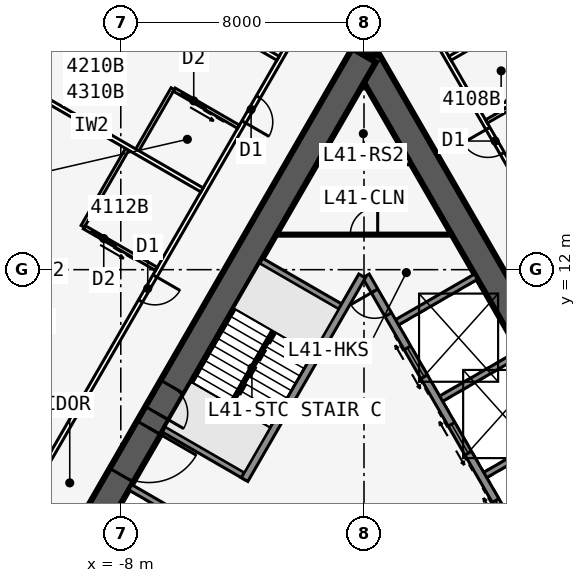
"""IFC4 building model, lengths in metres.
Left out: names, types, materials, properties, quantities, classifications, styles, units other than length and angle.
Written with IfcOpenShell. Run it as: python <this file> out.ifc"""

import sys

from ifc_helpers import new_model, si_unit, direction, frame, frame_2d, origin, place, context, subcontext, project, spatial, rectangle, extrude, element, fill, save


model = new_model("IFC4")
c1 = context("Model", 3, precision=1e-05, world=origin(), true_north=direction((0.0, 1.0)))
c2 = subcontext(c1, "Body", "Model", "MODEL_VIEW")
j1 = project(units=[si_unit("LENGTHUNIT", "METRE"), si_unit("PLANEANGLEUNIT", "RADIAN")], contexts=[c1])
p1 = place(None, origin())
s1 = spatial("IfcSite", under=j1, at=p1, CompositionType="ELEMENT")
p2 = place(p1, origin())
s2 = spatial("IfcBuilding", under=s1, at=p2, CompositionType="ELEMENT")
p3 = place(p2, frame((0.0, 0.0, 155.5)))
s3 = spatial("IfcBuildingStorey", under=s2, at=p3, CompositionType="ELEMENT", Elevation=155.5)
p4 = place(p3, frame((16.5, -9.526, 0.0), z_axis=(0.0, 0.0, 1.0), x_axis=(-0.499999749417, 0.866025548458, 0.0)))
e1 = element("IfcWall", 1, at=p4, inside=s3, PredefinedType="SHEAR", context=c2, shape_type="SweptSolid", body=[
    extrude(rectangle(XDim=33.0, YDim=0.9, at=frame_2d((16.5, 0.0))), origin(), (0.0, 0.0, 1.0), 3.4),
])
p5 = place(p4, frame((14.15, 0.0, 0.0)))
e2 = element("IfcOpeningElement", 2, at=p5, cuts=e1, PredefinedType="OPENING", context=c2, shape_type="SweptSolid", body=[
    extrude(rectangle(XDim=1.8, YDim=2.13, at=frame_2d((0.9, 1.065))), frame((0.0, 0.46, 0.0), z_axis=(0.0, -1.0, 0.0), x_axis=(1.0, 0.0, 0.0)), (0.0, 0.0, 1.0), 0.92),
])
p6 = place(p4, frame((12.6, 0.0, 0.0)))
e3 = element("IfcOpeningElement", 3, at=p6, cuts=e1, PredefinedType="OPENING", context=c2, shape_type="SweptSolid", body=[
    extrude(rectangle(XDim=1.0, YDim=2.13, at=frame_2d((0.5, 1.065))), frame((0.0, 0.46, 0.0), z_axis=(0.0, -1.0, 0.0), x_axis=(1.0, 0.0, 0.0)), (0.0, 0.0, 1.0), 0.92),
])
p7 = place(p3, frame((5.379, 2.586, 0.0), z_axis=(0.0, 0.0, 1.0), x_axis=(-0.500001375892, 0.866024609411, 0.0)))
e4 = element("IfcWall", 4, at=p7, inside=s3, PredefinedType="SOLIDWALL", context=c2, shape_type="SweptSolid", body=[
    extrude(rectangle(XDim=10.633, YDim=0.25, at=frame_2d((5.316, 0.0))), origin(), (0.0, 0.0, 1.0), 3.235),
])
p8 = place(p7, frame((9.164, 0.0, 0.0)))
e5 = element("IfcOpeningElement", 5, at=p8, cuts=e4, PredefinedType="OPENING", context=c2, shape_type="SweptSolid", body=[
    extrude(rectangle(XDim=0.9, YDim=2.13, at=frame_2d((0.45, 1.065))), frame((0.0, 0.135, 0.0), z_axis=(0.0, -1.0, 0.0), x_axis=(1.0, 0.0, 0.0)), (0.0, 0.0, 1.0), 0.27),
])
p9 = place(p7, frame((1.0, 0.0, 0.0)))
e6 = element("IfcOpeningElement", 6, at=p9, cuts=e4, PredefinedType="OPENING", context=c2, shape_type="SweptSolid", body=[
    extrude(rectangle(XDim=1.1, YDim=2.13, at=frame_2d((0.55, 1.065))), frame((0.0, 0.135, 0.0), z_axis=(0.0, -1.0, 0.0), x_axis=(1.0, 0.0, 0.0)), (0.0, 0.0, 1.0), 0.27),
])
p10 = place(p7, frame((3.9, 0.0, 0.0)))
e7 = element("IfcOpeningElement", 7, at=p10, cuts=e4, PredefinedType="OPENING", context=c2, shape_type="SweptSolid", body=[
    extrude(rectangle(XDim=1.1, YDim=2.13, at=frame_2d((0.55, 1.065))), frame((0.0, 0.135, 0.0), z_axis=(0.0, -1.0, 0.0), x_axis=(1.0, 0.0, 0.0)), (0.0, 0.0, 1.0), 0.27),
])
p11 = place(p7, frame((6.8, 0.0, 0.0)))
e8 = element("IfcOpeningElement", 8, at=p11, cuts=e4, PredefinedType="OPENING", context=c2, shape_type="SweptSolid", body=[
    extrude(rectangle(XDim=1.1, YDim=2.13, at=frame_2d((0.55, 1.065))), frame((0.0, 0.135, 0.0), z_axis=(0.0, -1.0, 0.0), x_axis=(1.0, 0.0, 0.0)), (0.0, 0.0, 1.0), 0.27),
])
for number, where, z_axis, x_axis in (
    (9, (3.879, 5.184, 0.0), (0.0, 0.0, 1.0), (0.866, 0.5, 0.0)),
    (10, (2.429, 7.696, 0.0), (0.0, 0.0, 1.0), (0.866, 0.5, 0.0)),
    (11, (0.979, 10.207, 0.0), (0.0, 0.0, 1.0), (0.866, 0.5, 0.0)),
):
    element("IfcWall", number, at=place(p3, frame(where, z_axis=z_axis, x_axis=x_axis)), inside=s3, PredefinedType="SOLIDWALL", context=c2, shape_type="SweptSolid", body=[
        extrude(rectangle(XDim=3.125, YDim=0.2, at=frame_2d((1.562, 0.0))), origin(), (0.0, 0.0, 1.0), 3.235),
    ])
p12 = place(p3, frame((0.0, 19.052, 0.0), z_axis=(0.0, 0.0, 1.0), x_axis=(-0.499999749417, -0.866025548458, 0.0)))
e12 = element("IfcWall", 12, at=p12, inside=s3, PredefinedType="SHEAR", context=c2, shape_type="SweptSolid", body=[
    extrude(rectangle(XDim=33.0, YDim=0.9, at=frame_2d((16.5, 0.0))), origin(), (0.0, 0.0, 1.0), 3.4),
])
p13 = place(p12, frame((14.15, 0.0, 0.0)))
e13 = element("IfcOpeningElement", 13, at=p13, cuts=e12, PredefinedType="OPENING", context=c2, shape_type="SweptSolid", body=[
    extrude(rectangle(XDim=1.8, YDim=2.13, at=frame_2d((0.9, 1.065))), frame((0.0, 0.46, 0.0), z_axis=(0.0, -1.0, 0.0), x_axis=(1.0, 0.0, 0.0)), (0.0, 0.0, 1.0), 0.92),
])
p14 = place(p12, frame((12.6, 0.0, 0.0)))
e14 = element("IfcOpeningElement", 14, at=p14, cuts=e12, PredefinedType="OPENING", context=c2, shape_type="SweptSolid", body=[
    extrude(rectangle(XDim=1.0, YDim=2.13, at=frame_2d((0.5, 1.065))), frame((0.0, 0.46, 0.0), z_axis=(0.0, -1.0, 0.0), x_axis=(1.0, 0.0, 0.0)), (0.0, 0.0, 1.0), 0.92),
])
p15 = place(p3, frame((-0.062, 11.794, 0.0), z_axis=(0.0, 0.0, 1.0), x_axis=(-0.500006680225, -0.86602154692, 0.0)))
e15 = element("IfcWall", 15, at=p15, inside=s3, PredefinedType="SOLIDWALL", context=c2, shape_type="SweptSolid", body=[
    extrude(rectangle(XDim=7.733, YDim=0.25, at=frame_2d((3.866, 0.0))), origin(), (0.0, 0.0, 1.0), 3.235),
])
for number, where, z_axis, x_axis in (
    (16, (-0.679, 10.727, 0.0), (0.0, 0.0, 1.0), (-0.866, 0.5, 0.0)),
    (17, (-3.879, 5.184, 0.0), (0.0, 0.0, 1.0), (-0.866, 0.5, 0.0)),
    (18, (-4.979, 3.279, 0.0), (0.0, 0.0, 1.0), (-0.866, 0.5, 0.0)),
):
    element("IfcWall", number, at=place(p3, frame(where, z_axis=z_axis, x_axis=x_axis)), inside=s3, PredefinedType="SOLIDWALL", context=c2, shape_type="SweptSolid", body=[
        extrude(rectangle(XDim=3.125, YDim=0.2, at=frame_2d((1.562, 0.0))), origin(), (0.0, 0.0, 1.0), 3.235),
    ])
p16 = place(p3, frame((0.0, 19.052, 0.0), z_axis=(0.0, 0.0, 1.0), x_axis=(0.0, 1.0, 0.0)))
e19 = element("IfcWall", 19, at=p16, inside=s3, PredefinedType="SHEAR", context=c2, shape_type="SweptSolid", body=[
    extrude(rectangle(XDim=4.746, YDim=0.9, at=frame_2d((2.373, 0.0))), origin(), (0.0, 0.0, 1.0), 3.4),
])
p17 = place(p16, frame((1.8, 0.0, 0.0)))
e20 = element("IfcOpeningElement", 20, at=p17, cuts=e19, PredefinedType="OPENING", context=c2, shape_type="SweptSolid", body=[
    extrude(rectangle(XDim=1.8, YDim=2.13, at=frame_2d((0.9, 1.065))), frame((0.0, 0.46, 0.0), z_axis=(0.0, -1.0, 0.0), x_axis=(1.0, 0.0, 0.0)), (0.0, 0.0, 1.0), 0.92),
])
p18 = place(p3, frame((-9.465, 22.76, 0.0), z_axis=(0.0, 0.0, 1.0), x_axis=(-0.641810386606, -0.766863369607, 0.0)))
e21 = element("IfcWall", 21, at=p18, inside=s3, PredefinedType="STANDARD", context=c2, shape_type="SweptSolid", body=[
    extrude(rectangle(XDim=5.076, YDim=0.25, at=frame_2d((2.538, 0.0))), origin(), (0.0, 0.0, 1.0), 3.235),
])
p19 = place(p18, frame((0.738, 0.0, 0.45)))
e22 = element("IfcOpeningElement", 22, at=p19, cuts=e21, PredefinedType="OPENING", context=c2, shape_type="SweptSolid", body=[
    extrude(rectangle(XDim=3.6, YDim=2.4, at=frame_2d((1.8, 1.2))), frame((0.0, 0.135, 0.0), z_axis=(0.0, -1.0, 0.0), x_axis=(1.0, 0.0, 0.0)), (0.0, 0.0, 1.0), 0.27),
])
p20 = place(p3, frame((20.027, -10.985, 0.0), z_axis=(0.0, 0.0, 1.0), x_axis=(-0.500001677587, 0.866024435227, 0.0)))
e23 = element("IfcWall", 23, at=p20, inside=s3, PredefinedType="PARTITIONING", context=c2, shape_type="SweptSolid", body=[
    extrude(rectangle(XDim=39.054, YDim=0.15, at=frame_2d((19.527, 0.0))), origin(), (0.0, 0.0, 1.0), 3.235),
])
p21 = place(p20, frame((1.558, 0.0, 0.0)))
e24 = element("IfcOpeningElement", 24, at=p21, cuts=e23, PredefinedType="OPENING", context=c2, shape_type="SweptSolid", body=[
    extrude(rectangle(XDim=0.95, YDim=2.13, at=frame_2d((0.475, 1.065))), frame((0.0, 0.085, 0.0), z_axis=(0.0, -1.0, 0.0), x_axis=(1.0, 0.0, 0.0)), (0.0, 0.0, 1.0), 0.17),
])
p22 = place(p20, frame((15.352, 0.0, 0.0)))
e25 = element("IfcOpeningElement", 25, at=p22, cuts=e23, PredefinedType="OPENING", context=c2, shape_type="SweptSolid", body=[
    extrude(rectangle(XDim=0.95, YDim=2.13, at=frame_2d((0.475, 1.065))), frame((0.0, 0.085, 0.0), z_axis=(0.0, -1.0, 0.0), x_axis=(1.0, 0.0, 0.0)), (0.0, 0.0, 1.0), 0.17),
])
p23 = place(p20, frame((22.752, 0.0, 0.0)))
e26 = element("IfcOpeningElement", 26, at=p23, cuts=e23, PredefinedType="OPENING", context=c2, shape_type="SweptSolid", body=[
    extrude(rectangle(XDim=0.95, YDim=2.13, at=frame_2d((0.475, 1.065))), frame((0.0, 0.085, 0.0), z_axis=(0.0, -1.0, 0.0), x_axis=(1.0, 0.0, 0.0)), (0.0, 0.0, 1.0), 0.17),
])
p24 = place(p20, frame((30.952, 0.0, 0.0)))
e27 = element("IfcOpeningElement", 27, at=p24, cuts=e23, PredefinedType="OPENING", context=c2, shape_type="SweptSolid", body=[
    extrude(rectangle(XDim=0.95, YDim=2.13, at=frame_2d((0.475, 1.065))), frame((0.0, 0.085, 0.0), z_axis=(0.0, -1.0, 0.0), x_axis=(1.0, 0.0, 0.0)), (0.0, 0.0, 1.0), 0.17),
])
p25 = place(p20, frame((37.752, 0.0, 0.0)))
e28 = element("IfcOpeningElement", 28, at=p25, cuts=e23, PredefinedType="OPENING", context=c2, shape_type="SweptSolid", body=[
    extrude(rectangle(XDim=0.95, YDim=2.13, at=frame_2d((0.475, 1.065))), frame((0.0, 0.085, 0.0), z_axis=(0.0, -1.0, 0.0), x_axis=(1.0, 0.0, 0.0)), (0.0, 0.0, 1.0), 0.17),
])
p26 = place(p3, frame((2.829, 18.954, 0.0), z_axis=(0.0, 0.0, 1.0), x_axis=(0.866015739374, 0.500016738876, 0.0)))
e29 = element("IfcWall", 29, at=p26, inside=s3, PredefinedType="PARTITIONING", context=c2, shape_type="SweptSolid", body=[
    extrude(rectangle(XDim=7.516, YDim=0.15, at=frame_2d((3.758, 0.0))), origin(), (0.0, 0.0, 1.0), 2.389),
])
p27 = place(p3, frame((4.029, 16.875, 0.0), z_axis=(0.0, 0.0, 1.0), x_axis=(0.865980627057, 0.500077547548, 0.0)))
e30 = element("IfcWall", 30, at=p27, inside=s3, PredefinedType="PLUMBINGWALL", context=c2, shape_type="SweptSolid", body=[
    extrude(rectangle(XDim=2.44, YDim=0.12, at=frame_2d((1.22, 0.0))), origin(), (0.0, 0.0, 1.0), 3.235),
])
p28 = place(p27, frame((1.25, 0.0, 0.0)))
e31 = element("IfcOpeningElement", 31, at=p28, cuts=e30, PredefinedType="OPENING", context=c2, shape_type="SweptSolid", body=[
    extrude(rectangle(XDim=0.9, YDim=2.13, at=frame_2d((0.45, 1.065))), frame((0.0, 0.07, 0.0), z_axis=(0.0, -1.0, 0.0), x_axis=(1.0, 0.0, 0.0)), (0.0, 0.0, 1.0), 0.14),
])
p29 = place(p3, frame((-0.5, 22.836, 0.0), z_axis=(0.0, 0.0, 1.0), x_axis=(-0.500001677587, -0.866024435227, 0.0)))
e32 = element("IfcWall", 32, at=p29, inside=s3, PredefinedType="PARTITIONING", context=c2, shape_type="SweptSolid", body=[
    extrude(rectangle(XDim=39.054, YDim=0.15, at=frame_2d((19.527, 0.0))), origin(), (0.0, 0.0, 1.0), 3.235),
])
p30 = place(p29, frame((0.352, 0.0, 0.0)))
e33 = element("IfcOpeningElement", 33, at=p30, cuts=e32, PredefinedType="OPENING", context=c2, shape_type="SweptSolid", body=[
    extrude(rectangle(XDim=0.95, YDim=2.13, at=frame_2d((0.475, 1.065))), frame((0.0, 0.085, 0.0), z_axis=(0.0, -1.0, 0.0), x_axis=(1.0, 0.0, 0.0)), (0.0, 0.0, 1.0), 0.17),
])
p31 = place(p29, frame((5.952, 0.0, 0.0)))
e34 = element("IfcOpeningElement", 34, at=p31, cuts=e32, PredefinedType="OPENING", context=c2, shape_type="SweptSolid", body=[
    extrude(rectangle(XDim=0.95, YDim=2.13, at=frame_2d((0.475, 1.065))), frame((0.0, 0.085, 0.0), z_axis=(0.0, -1.0, 0.0), x_axis=(1.0, 0.0, 0.0)), (0.0, 0.0, 1.0), 0.17),
])
p32 = place(p29, frame((12.752, 0.0, 0.0)))
e35 = element("IfcOpeningElement", 35, at=p32, cuts=e32, PredefinedType="OPENING", context=c2, shape_type="SweptSolid", body=[
    extrude(rectangle(XDim=0.95, YDim=2.13, at=frame_2d((0.475, 1.065))), frame((0.0, 0.085, 0.0), z_axis=(0.0, -1.0, 0.0), x_axis=(1.0, 0.0, 0.0)), (0.0, 0.0, 1.0), 0.17),
])
p33 = place(p29, frame((25.352, 0.0, 0.0)))
e36 = element("IfcOpeningElement", 36, at=p33, cuts=e32, PredefinedType="OPENING", context=c2, shape_type="SweptSolid", body=[
    extrude(rectangle(XDim=0.95, YDim=2.13, at=frame_2d((0.475, 1.065))), frame((0.0, 0.085, 0.0), z_axis=(0.0, -1.0, 0.0), x_axis=(1.0, 0.0, 0.0)), (0.0, 0.0, 1.0), 0.17),
])
p34 = place(p29, frame((32.152, 0.0, 0.0)))
e37 = element("IfcOpeningElement", 37, at=p34, cuts=e32, PredefinedType="OPENING", context=c2, shape_type="SweptSolid", body=[
    extrude(rectangle(XDim=0.95, YDim=2.13, at=frame_2d((0.475, 1.065))), frame((0.0, 0.085, 0.0), z_axis=(0.0, -1.0, 0.0), x_axis=(1.0, 0.0, 0.0)), (0.0, 0.0, 1.0), 0.17),
])
p35 = place(p29, frame((37.752, 0.0, 0.0)))
e38 = element("IfcOpeningElement", 38, at=p35, cuts=e32, PredefinedType="OPENING", context=c2, shape_type="SweptSolid", body=[
    extrude(rectangle(XDim=0.95, YDim=2.13, at=frame_2d((0.475, 1.065))), frame((0.0, 0.085, 0.0), z_axis=(0.0, -1.0, 0.0), x_axis=(1.0, 0.0, 0.0)), (0.0, 0.0, 1.0), 0.17),
])
p36 = place(p3, frame((-2.829, 18.954, 0.0), z_axis=(0.0, 0.0, 1.0), x_axis=(-0.866015739374, 0.500016738876, 0.0)))
e39 = element("IfcWall", 39, at=p36, inside=s3, PredefinedType="PARTITIONING", context=c2, shape_type="SweptSolid", body=[
    extrude(rectangle(XDim=7.516, YDim=0.15, at=frame_2d((3.758, 0.0))), origin(), (0.0, 0.0, 1.0), 2.389),
])
p37 = place(p3, frame((-5.329, 14.623, 0.0), z_axis=(0.0, 0.0, 1.0), x_axis=(-0.866011723728, 0.500023693804, 0.0)))
e40 = element("IfcWall", 40, at=p37, inside=s3, PredefinedType="PARTITIONING", context=c2, shape_type="SweptSolid", body=[
    extrude(rectangle(XDim=8.395, YDim=0.15, at=frame_2d((4.198, 0.0))), origin(), (0.0, 0.0, 1.0), 2.389),
])
p38 = place(p3, frame((-6.293, 17.952, 0.0), z_axis=(0.0, 0.0, 1.0), x_axis=(-0.499957262057, -0.866050077142, 0.0)))
e41 = element("IfcWall", 41, at=p38, inside=s3, PredefinedType="PLUMBINGWALL", context=c2, shape_type="SweptSolid", body=[
    extrude(rectangle(XDim=2.4, YDim=0.12, at=frame_2d((1.2, 0.0))), origin(), (0.0, 0.0, 1.0), 3.235),
])
p39 = place(p3, frame((-4.128, 16.702, 0.0), z_axis=(0.0, 0.0, 1.0), x_axis=(-0.866048967903, 0.499959183527, 0.0)))
e42 = element("IfcWall", 42, at=p39, inside=s3, PredefinedType="PLUMBINGWALL", context=c2, shape_type="SweptSolid", body=[
    extrude(rectangle(XDim=2.44, YDim=0.12, at=frame_2d((1.22, 0.0))), origin(), (0.0, 0.0, 1.0), 3.235),
])
p40 = place(p39, frame((1.25, 0.0, 0.0)))
e43 = element("IfcOpeningElement", 43, at=p40, cuts=e42, PredefinedType="OPENING", context=c2, shape_type="SweptSolid", body=[
    extrude(rectangle(XDim=0.9, YDim=2.13, at=frame_2d((0.45, 1.065))), frame((0.0, 0.07, 0.0), z_axis=(0.0, -1.0, 0.0), x_axis=(1.0, 0.0, 0.0)), (0.0, 0.0, 1.0), 0.14),
])
p41 = place(p3, frame((-7.753, 16.023, 0.0), z_axis=(0.0, 0.0, 1.0), x_axis=(-0.499990139034, -0.866031096941, 0.0)))
e44 = element("IfcWall", 44, at=p41, inside=s3, PredefinedType="PLUMBINGWALL", context=c2, shape_type="SweptSolid", body=[
    extrude(rectangle(XDim=3.0, YDim=0.12, at=frame_2d((1.5, 0.0))), origin(), (0.0, 0.0, 1.0), 3.235),
])
p42 = place(p3, frame((-6.829, 12.025, 0.0), z_axis=(0.0, 0.0, 1.0), x_axis=(-0.866035715982, 0.499982138324, 0.0)))
e45 = element("IfcWall", 45, at=p42, inside=s3, PredefinedType="PLUMBINGWALL", context=c2, shape_type="SweptSolid", body=[
    extrude(rectangle(XDim=2.74, YDim=0.12, at=frame_2d((1.37, 0.0))), origin(), (0.0, 0.0, 1.0), 3.235),
])
p43 = place(p42, frame((1.55, 0.0, 0.0)))
e46 = element("IfcOpeningElement", 46, at=p43, cuts=e45, PredefinedType="OPENING", context=c2, shape_type="SweptSolid", body=[
    extrude(rectangle(XDim=0.9, YDim=2.13, at=frame_2d((0.45, 1.065))), frame((0.0, 0.07, 0.0), z_axis=(0.0, -1.0, 0.0), x_axis=(1.0, 0.0, 0.0)), (0.0, 0.0, 1.0), 0.14),
])
p44 = place(p3, frame((-1.501, 15.552, 0.0), z_axis=(0.0, 0.0, 1.0), x_axis=(1.0, 0.0, 0.0)))
e47 = element("IfcWall", 47, at=p44, inside=s3, PredefinedType="SOLIDWALL", context=c2, shape_type="SweptSolid", body=[
    extrude(rectangle(XDim=3.002, YDim=0.2, at=frame_2d((1.501, 0.0))), origin(), (0.0, 0.0, 1.0), 3.235),
])
p45 = place(p3, frame((-2.887, 13.153, 0.0), z_axis=(0.0, 0.0, 1.0), x_axis=(1.0, 0.0, 0.0)))
e48 = element("IfcWall", 48, at=p45, inside=s3, PredefinedType="PARTITIONING", context=c2, shape_type="SweptSolid", body=[
    extrude(rectangle(XDim=5.773, YDim=0.1, at=frame_2d((2.887, 0.0))), origin(), (0.0, 0.0, 1.0), 3.235),
])
p46 = place(p45, frame((2.437, 0.0, 0.0)))
e49 = element("IfcOpeningElement", 49, at=p46, cuts=e48, PredefinedType="OPENING", context=c2, shape_type="SweptSolid", body=[
    extrude(rectangle(XDim=0.9, YDim=2.13, at=frame_2d((0.45, 1.065))), frame((0.0, 0.06, 0.0), z_axis=(0.0, -1.0, 0.0), x_axis=(1.0, 0.0, 0.0)), (0.0, 0.0, 1.0), 0.12),
])
p47 = place(p3, frame((-2.988, 9.978, 0.0), z_axis=(0.0, 0.0, 1.0), x_axis=(-0.499992232847, -0.866029888106, 0.0)))
e50 = element("IfcWall", 50, at=p47, inside=s3, PredefinedType="SOLIDWALL", context=c2, shape_type="SweptSolid", body=[
    extrude(rectangle(XDim=2.794, YDim=0.1, at=frame_2d((1.397, 0.0))), origin(), (0.0, 0.0, 1.0), 3.4),
])
p48 = place(p24, origin())
e51 = element("IfcDoor", 51, at=p48, inside=s3, OperationType="SINGLE_SWING_RIGHT", PredefinedType="DOOR", context=c2, shape_type="SweptSolid", body=[
    extrude(rectangle(XDim=0.95, YDim=2.13, at=frame_2d((0.475, 1.065))), frame((0.0, 0.025, 0.0), z_axis=(0.0, -1.0, 0.0), x_axis=(1.0, 0.0, 0.0)), (0.0, 0.0, 1.0), 0.05),
])
fill(e27, e51)
p49 = place(p40, origin())
e52 = element("IfcDoor", 52, at=p49, inside=s3, OperationType="SLIDING_TO_LEFT", PredefinedType="DOOR", context=c2, shape_type="SweptSolid", body=[
    extrude(rectangle(XDim=0.9, YDim=2.13, at=frame_2d((0.45, 1.065))), frame((0.0, 0.025, 0.0), z_axis=(0.0, -1.0, 0.0), x_axis=(1.0, 0.0, 0.0)), (0.0, 0.0, 1.0), 0.05),
])
fill(e43, e52)
p50 = place(p31, origin())
e53 = element("IfcDoor", 53, at=p50, inside=s3, OperationType="SINGLE_SWING_RIGHT", PredefinedType="DOOR", context=c2, shape_type="SweptSolid", body=[
    extrude(rectangle(XDim=0.95, YDim=2.13, at=frame_2d((0.475, 1.065))), frame((0.0, 0.025, 0.0), z_axis=(0.0, -1.0, 0.0), x_axis=(1.0, 0.0, 0.0)), (0.0, 0.0, 1.0), 0.05),
])
fill(e34, e53)
p51 = place(p43, origin())
e54 = element("IfcDoor", 54, at=p51, inside=s3, OperationType="SLIDING_TO_LEFT", PredefinedType="DOOR", context=c2, shape_type="SweptSolid", body=[
    extrude(rectangle(XDim=0.9, YDim=2.13, at=frame_2d((0.45, 1.065))), frame((0.0, 0.025, 0.0), z_axis=(0.0, -1.0, 0.0), x_axis=(1.0, 0.0, 0.0)), (0.0, 0.0, 1.0), 0.05),
])
fill(e46, e54)
p52 = place(p32, origin())
e55 = element("IfcDoor", 55, at=p52, inside=s3, OperationType="SINGLE_SWING_LEFT", PredefinedType="DOOR", context=c2, shape_type="SweptSolid", body=[
    extrude(rectangle(XDim=0.95, YDim=2.13, at=frame_2d((0.475, 1.065))), frame((0.0, 0.025, 0.0), z_axis=(0.0, -1.0, 0.0), x_axis=(1.0, 0.0, 0.0)), (0.0, 0.0, 1.0), 0.05),
])
fill(e35, e55)
p53 = place(p13, origin())
e56 = element("IfcDoor", 56, at=p53, inside=s3, OperationType="DOUBLE_DOOR_SINGLE_SWING", PredefinedType="DOOR", context=c2, shape_type="SweptSolid", body=[
    extrude(rectangle(XDim=1.8, YDim=2.13, at=frame_2d((0.9, 1.065))), frame((0.0, 0.025, 0.0), z_axis=(0.0, -1.0, 0.0), x_axis=(1.0, 0.0, 0.0)), (0.0, 0.0, 1.0), 0.05),
])
fill(e13, e56)
p54 = place(p14, origin())
e57 = element("IfcDoor", 57, at=p54, inside=s3, OperationType="SINGLE_SWING_RIGHT", PredefinedType="DOOR", context=c2, shape_type="SweptSolid", body=[
    extrude(rectangle(XDim=1.0, YDim=2.13, at=frame_2d((0.5, 1.065))), frame((0.0, 0.025, 0.0), z_axis=(0.0, -1.0, 0.0), x_axis=(1.0, 0.0, 0.0)), (0.0, 0.0, 1.0), 0.05),
])
fill(e14, e57)
p55 = place(p46, origin())
e58 = element("IfcDoor", 58, at=p55, inside=s3, OperationType="SINGLE_SWING_RIGHT", PredefinedType="DOOR", context=c2, shape_type="SweptSolid", body=[
    extrude(rectangle(XDim=0.9, YDim=2.13, at=frame_2d((0.45, 1.065))), frame((0.0, 0.025, 0.0), z_axis=(0.0, -1.0, 0.0), x_axis=(1.0, 0.0, 0.0)), (0.0, 0.0, 1.0), 0.05),
])
fill(e49, e58)
p56 = place(p8, origin())
e59 = element("IfcDoor", 59, at=p56, inside=s3, OperationType="SINGLE_SWING_RIGHT", PredefinedType="DOOR", context=c2, shape_type="SweptSolid", body=[
    extrude(rectangle(XDim=0.9, YDim=2.13, at=frame_2d((0.45, 1.065))), frame((0.0, 0.025, 0.0), z_axis=(0.0, -1.0, 0.0), x_axis=(1.0, 0.0, 0.0)), (0.0, 0.0, 1.0), 0.05),
])
fill(e5, e59)
p57 = place(p9, origin())
e60 = element("IfcDoor", 60, at=p57, inside=s3, OperationType="DOUBLE_DOOR_SLIDING", PredefinedType="USERDEFINED", context=c2, shape_type="SweptSolid", body=[
    extrude(rectangle(XDim=1.1, YDim=2.13, at=frame_2d((0.55, 1.065))), frame((0.0, 0.025, 0.0), z_axis=(0.0, -1.0, 0.0), x_axis=(1.0, 0.0, 0.0)), (0.0, 0.0, 1.0), 0.05),
])
fill(e6, e60)
p58 = place(p10, origin())
e61 = element("IfcDoor", 61, at=p58, inside=s3, OperationType="DOUBLE_DOOR_SLIDING", PredefinedType="USERDEFINED", context=c2, shape_type="SweptSolid", body=[
    extrude(rectangle(XDim=1.1, YDim=2.13, at=frame_2d((0.55, 1.065))), frame((0.0, 0.025, 0.0), z_axis=(0.0, -1.0, 0.0), x_axis=(1.0, 0.0, 0.0)), (0.0, 0.0, 1.0), 0.05),
])
fill(e7, e61)
p59 = place(p11, origin())
e62 = element("IfcDoor", 62, at=p59, inside=s3, OperationType="DOUBLE_DOOR_SLIDING", PredefinedType="USERDEFINED", context=c2, shape_type="SweptSolid", body=[
    extrude(rectangle(XDim=1.1, YDim=2.13, at=frame_2d((0.55, 1.065))), frame((0.0, 0.025, 0.0), z_axis=(0.0, -1.0, 0.0), x_axis=(1.0, 0.0, 0.0)), (0.0, 0.0, 1.0), 0.05),
])
fill(e8, e62)
save(model, sys.argv[1])
